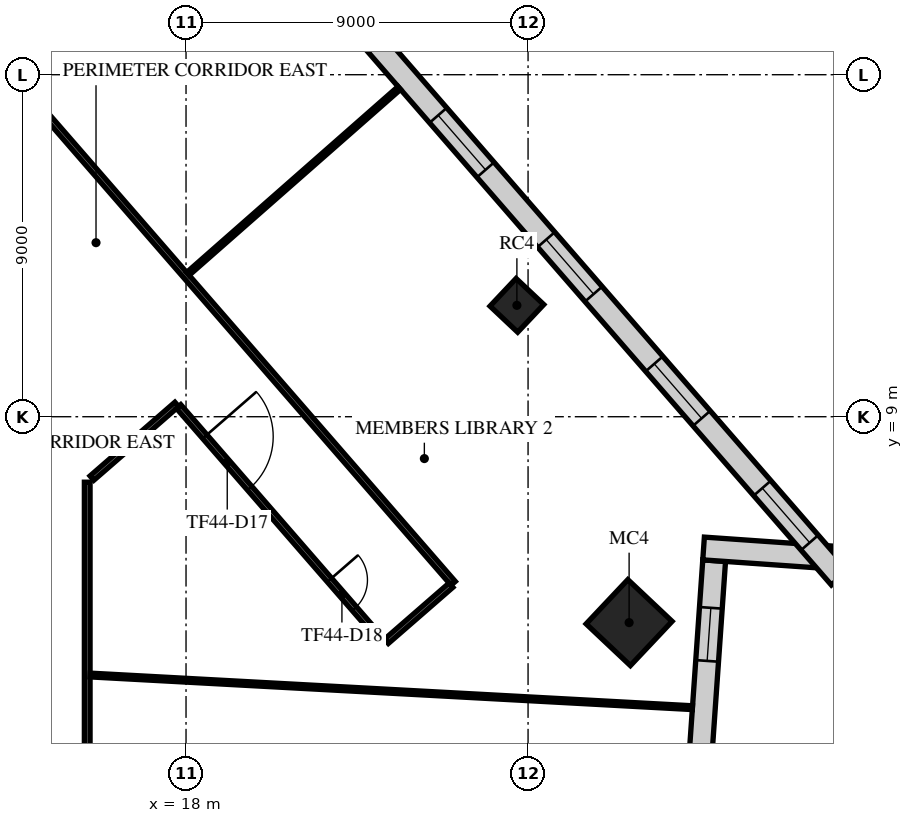
"""IFC4 building model, lengths in metres.
Left out: names, types, materials, properties, quantities, classifications, styles, units other than length and angle.
Written with IfcOpenShell. Run it as: python <this file> out.ifc"""

import sys

from ifc_helpers import new_model, si_unit, direction, frame, frame_2d, origin, origin_2d, place, context, subcontext, project, spatial, rectangle, extrude, element, fill, save


model = new_model("IFC4")
c1 = context("Model", 3, precision=1e-05, world=origin(), true_north=direction((0.0, 1.0)))
c2 = subcontext(c1, "Body", "Model", "MODEL_VIEW")
j1 = project(units=[si_unit("LENGTHUNIT", "METRE"), si_unit("PLANEANGLEUNIT", "RADIAN")], contexts=[c1])
p1 = place(None, origin())
s1 = spatial("IfcSite", under=j1, at=p1, CompositionType="ELEMENT")
p2 = place(p1, origin())
s2 = spatial("IfcBuilding", under=s1, at=p2, CompositionType="ELEMENT")
p3 = place(p2, frame((0.0, 0.0, 193.3)))
s3 = spatial("IfcBuildingStorey", under=s2, at=p3, CompositionType="ELEMENT", Elevation=193.3)
p4 = place(p3, frame((29.659, 3.582, 0.0), z_axis=(0.0, 0.0, 1.0), x_axis=(0.685916152371, 0.727680583715, 0.0)))
e1 = element("IfcColumn", 1, at=p4, inside=s3, PredefinedType="COLUMN", context=c2, shape_type="SweptSolid", body=[
    extrude(rectangle(XDim=1.6, YDim=1.6, at=origin_2d()), origin(), (0.0, 0.0, 1.0), 4.0),
])
p5 = place(p3, frame((26.706, 11.931, 0.0), z_axis=(0.0, 0.0, 1.0), x_axis=(0.685916152371, 0.727680583715, 0.0)))
e2 = element("IfcColumn", 2, at=p5, inside=s3, PredefinedType="COLUMN", context=c2, shape_type="SweptSolid", body=[
    extrude(rectangle(XDim=1.0, YDim=1.0, at=origin_2d()), origin(), (0.0, 0.0, 1.0), 4.0),
])
p6 = place(p3, frame((31.354, -2.547, 0.0), z_axis=(0.0, 0.0, 1.0), x_axis=(0.069743544409, 0.997564954283, 0.0)))
e3 = element("IfcWall", 3, at=p6, inside=s3, PredefinedType="STANDARD", context=c2, shape_type="SweptSolid", body=[
    extrude(rectangle(XDim=7.778, YDim=0.6, at=frame_2d((3.889, 0.0))), origin(), (0.0, 0.0, 1.0), 3.62),
])
p7 = place(p6, frame((1.244, 0.0, 0.9)))
e4 = element("IfcOpeningElement", 4, at=p7, cuts=e3, PredefinedType="OPENING", context=c2, shape_type="SweptSolid", body=[
    extrude(rectangle(XDim=1.4, YDim=2.1, at=frame_2d((0.7, 1.05))), frame((0.0, 0.31, 0.0), z_axis=(0.0, -1.0, 0.0), x_axis=(1.0, 0.0, 0.0)), (0.0, 0.0, 1.0), 0.62),
])
p8 = place(p6, frame((5.134, 0.0, 0.9)))
e5 = element("IfcOpeningElement", 5, at=p8, cuts=e3, PredefinedType="OPENING", context=c2, shape_type="SweptSolid", body=[
    extrude(rectangle(XDim=1.4, YDim=2.1, at=frame_2d((0.7, 1.05))), frame((0.0, 0.31, 0.0), z_axis=(0.0, -1.0, 0.0), x_axis=(1.0, 0.0, 0.0)), (0.0, 0.0, 1.0), 0.62),
])
p9 = place(p3, frame((31.618, 5.532, 0.0), z_axis=(0.0, 0.0, 1.0), x_axis=(0.997563916762, -0.069758382828, 0.0)))
e6 = element("IfcWall", 6, at=p9, inside=s3, PredefinedType="STANDARD", context=c2, shape_type="SweptSolid", body=[
    extrude(rectangle(XDim=3.846, YDim=0.6, at=frame_2d((1.923, 0.0))), origin(), (0.0, 0.0, 1.0), 3.62),
])
p10 = place(p3, frame((35.208, 4.768, 0.0), z_axis=(0.0, 0.0, 1.0), x_axis=(-0.656058749455, 0.754709823219, 0.0)))
e7 = element("IfcWall", 7, at=p10, inside=s3, PredefinedType="STANDARD", context=c2, shape_type="SweptSolid", body=[
    extrude(rectangle(XDim=39.0, YDim=0.6, at=frame_2d((19.5, 0.0))), origin(), (0.0, 0.0, 1.0), 3.62),
])
p11 = place(p10, frame((1.217, 0.0, 0.9)))
e8 = element("IfcOpeningElement", 8, at=p11, cuts=e7, PredefinedType="OPENING", context=c2, shape_type="SweptSolid", body=[
    extrude(rectangle(XDim=1.9, YDim=2.1, at=frame_2d((0.95, 1.05))), frame((0.0, 0.31, 0.0), z_axis=(0.0, -1.0, 0.0), x_axis=(1.0, 0.0, 0.0)), (0.0, 0.0, 1.0), 0.62),
])
p12 = place(p10, frame((5.55, 0.0, 0.9)))
e9 = element("IfcOpeningElement", 9, at=p12, cuts=e7, PredefinedType="OPENING", context=c2, shape_type="SweptSolid", body=[
    extrude(rectangle(XDim=1.9, YDim=2.1, at=frame_2d((0.95, 1.05))), frame((0.0, 0.31, 0.0), z_axis=(0.0, -1.0, 0.0), x_axis=(1.0, 0.0, 0.0)), (0.0, 0.0, 1.0), 0.62),
])
p13 = place(p10, frame((9.883, 0.0, 0.9)))
e10 = element("IfcOpeningElement", 10, at=p13, cuts=e7, PredefinedType="OPENING", context=c2, shape_type="SweptSolid", body=[
    extrude(rectangle(XDim=1.9, YDim=2.1, at=frame_2d((0.95, 1.05))), frame((0.0, 0.31, 0.0), z_axis=(0.0, -1.0, 0.0), x_axis=(1.0, 0.0, 0.0)), (0.0, 0.0, 1.0), 0.62),
])
p14 = place(p10, frame((14.217, 0.0, 0.9)))
e11 = element("IfcOpeningElement", 11, at=p14, cuts=e7, PredefinedType="OPENING", context=c2, shape_type="SweptSolid", body=[
    extrude(rectangle(XDim=1.9, YDim=2.1, at=frame_2d((0.95, 1.05))), frame((0.0, 0.31, 0.0), z_axis=(0.0, -1.0, 0.0), x_axis=(1.0, 0.0, 0.0)), (0.0, 0.0, 1.0), 0.62),
])
p15 = place(p10, frame((18.55, 0.0, 0.9)))
e12 = element("IfcOpeningElement", 12, at=p15, cuts=e7, PredefinedType="OPENING", context=c2, shape_type="SweptSolid", body=[
    extrude(rectangle(XDim=1.9, YDim=2.1, at=frame_2d((0.95, 1.05))), frame((0.0, 0.31, 0.0), z_axis=(0.0, -1.0, 0.0), x_axis=(1.0, 0.0, 0.0)), (0.0, 0.0, 1.0), 0.62),
])
p16 = place(p10, frame((22.883, 0.0, 0.9)))
e13 = element("IfcOpeningElement", 13, at=p16, cuts=e7, PredefinedType="OPENING", context=c2, shape_type="SweptSolid", body=[
    extrude(rectangle(XDim=1.9, YDim=2.1, at=frame_2d((0.95, 1.05))), frame((0.0, 0.31, 0.0), z_axis=(0.0, -1.0, 0.0), x_axis=(1.0, 0.0, 0.0)), (0.0, 0.0, 1.0), 0.62),
])
p17 = place(p10, frame((27.217, 0.0, 0.9)))
e14 = element("IfcOpeningElement", 14, at=p17, cuts=e7, PredefinedType="OPENING", context=c2, shape_type="SweptSolid", body=[
    extrude(rectangle(XDim=1.9, YDim=2.1, at=frame_2d((0.95, 1.05))), frame((0.0, 0.31, 0.0), z_axis=(0.0, -1.0, 0.0), x_axis=(1.0, 0.0, 0.0)), (0.0, 0.0, 1.0), 0.62),
])
p18 = place(p10, frame((31.55, 0.0, 0.9)))
e15 = element("IfcOpeningElement", 15, at=p18, cuts=e7, PredefinedType="OPENING", context=c2, shape_type="SweptSolid", body=[
    extrude(rectangle(XDim=1.9, YDim=2.1, at=frame_2d((0.95, 1.05))), frame((0.0, 0.31, 0.0), z_axis=(0.0, -1.0, 0.0), x_axis=(1.0, 0.0, 0.0)), (0.0, 0.0, 1.0), 0.62),
])
p19 = place(p10, frame((35.883, 0.0, 0.9)))
e16 = element("IfcOpeningElement", 16, at=p19, cuts=e7, PredefinedType="OPENING", context=c2, shape_type="SweptSolid", body=[
    extrude(rectangle(XDim=1.9, YDim=2.1, at=frame_2d((0.95, 1.05))), frame((0.0, 0.31, 0.0), z_axis=(0.0, -1.0, 0.0), x_axis=(1.0, 0.0, 0.0)), (0.0, 0.0, 1.0), 0.62),
])
p20 = place(p3, frame((8.103, 24.087, 0.0), z_axis=(0.0, 0.0, 1.0), x_axis=(0.656048444225, -0.754718781289, 0.0)))
e17 = element("IfcWall", 17, at=p20, inside=s3, PredefinedType="PARTITIONING", context=c2, shape_type="SweptSolid", body=[
    extrude(rectangle(XDim=25.8, YDim=0.15, at=frame_2d((12.9, 0.0))), origin(), (0.0, 0.0, 1.0), 3.17),
])
p21 = place(p3, frame((15.4, -8.667, 0.0), z_axis=(0.0, 0.0, 1.0), x_axis=(0.0, 1.0, 0.0)))
e18 = element("IfcWall", 18, at=p21, inside=s3, PredefinedType="PARTITIONING", context=c2, shape_type="SweptSolid", body=[
    extrude(rectangle(XDim=15.944, YDim=0.15, at=frame_2d((7.972, 0.0))), origin(), (0.0, 0.0, 1.0), 3.17),
])
p22 = place(p3, frame((15.524, 7.385, 0.0), z_axis=(0.0, 0.0, 1.0), x_axis=(0.754751247574, 0.656011093111, 0.0)))
e19 = element("IfcWall", 19, at=p22, inside=s3, PredefinedType="PARTITIONING", context=c2, shape_type="SweptSolid", body=[
    extrude(rectangle(XDim=2.957, YDim=0.15, at=frame_2d((1.479, 0.0))), origin(), (0.0, 0.0, 1.0), 3.17),
])
p23 = place(p3, frame((17.805, 9.268, 0.0), z_axis=(0.0, 0.0, 1.0), x_axis=(0.656027059873, -0.754737369364, 0.0)))
e20 = element("IfcWall", 20, at=p23, inside=s3, PredefinedType="PARTITIONING", context=c2, shape_type="SweptSolid", body=[
    extrude(rectangle(XDim=8.251, YDim=0.15, at=frame_2d((4.125, 0.0))), origin(), (0.0, 0.0, 1.0), 3.17),
])
p24 = place(p23, frame((1.05, 0.0, 0.0)))
e21 = element("IfcOpeningElement", 21, at=p24, cuts=e20, PredefinedType="OPENING", context=c2, shape_type="SweptSolid", body=[
    extrude(rectangle(XDim=1.8, YDim=2.1, at=frame_2d((0.9, 1.05))), frame((0.0, 0.085, 0.0), z_axis=(0.0, -1.0, 0.0), x_axis=(1.0, 0.0, 0.0)), (0.0, 0.0, 1.0), 0.17),
])
p25 = place(p23, frame((6.05, 0.0, 0.0)))
e22 = element("IfcOpeningElement", 22, at=p25, cuts=e20, PredefinedType="OPENING", context=c2, shape_type="SweptSolid", body=[
    extrude(rectangle(XDim=1.0, YDim=2.1, at=frame_2d((0.5, 1.05))), frame((0.0, 0.085, 0.0), z_axis=(0.0, -1.0, 0.0), x_axis=(1.0, 0.0, 0.0)), (0.0, 0.0, 1.0), 0.17),
])
p26 = place(p3, frame((23.275, 3.09, 0.0), z_axis=(0.0, 0.0, 1.0), x_axis=(0.754495728819, 0.656304955942, 0.0)))
e23 = element("IfcWall", 23, at=p26, inside=s3, PredefinedType="PARTITIONING", context=c2, shape_type="SweptSolid", body=[
    extrude(rectangle(XDim=2.25, YDim=0.15, at=frame_2d((1.125, 0.0))), origin(), (0.0, 0.0, 1.0), 3.17),
])
p27 = place(p3, frame((15.478, 2.203, 0.0), z_axis=(0.0, 0.0, 1.0), x_axis=(0.998532575908, -0.054154361321, 0.0)))
e24 = element("IfcWall", 24, at=p27, inside=s3, PredefinedType="PARTITIONING", context=c2, shape_type="SweptSolid", body=[
    extrude(rectangle(XDim=15.869, YDim=0.1, at=frame_2d((7.935, 0.0))), origin(), (0.0, 0.0, 1.0), 3.62),
])
p28 = place(p3, frame((18.05, 12.76, 0.0), z_axis=(0.0, 0.0, 1.0), x_axis=(0.751001885152, 0.660300059441, 0.0)))
e25 = element("IfcWall", 25, at=p28, inside=s3, PredefinedType="PARTITIONING", context=c2, shape_type="SweptSolid", body=[
    extrude(rectangle(XDim=7.405, YDim=0.1, at=frame_2d((3.702, 0.0))), origin(), (0.0, 0.0, 1.0), 3.17),
])
p29 = place(p8, origin())
e26 = element("IfcWindow", 26, at=p29, inside=s3, PartitioningType="SINGLE_PANEL", PredefinedType="WINDOW", context=c2, shape_type="SweptSolid", body=[
    extrude(rectangle(XDim=1.4, YDim=2.1, at=frame_2d((0.7, 1.05))), frame((0.0, 0.03, 0.0), z_axis=(0.0, -1.0, 0.0), x_axis=(1.0, 0.0, 0.0)), (0.0, 0.0, 1.0), 0.06),
])
fill(e5, e26)
p30 = place(p11, origin())
e27 = element("IfcWindow", 27, at=p30, inside=s3, PartitioningType="SINGLE_PANEL", PredefinedType="WINDOW", context=c2, shape_type="SweptSolid", body=[
    extrude(rectangle(XDim=1.9, YDim=2.1, at=frame_2d((0.95, 1.05))), frame((0.0, 0.03, 0.0), z_axis=(0.0, -1.0, 0.0), x_axis=(1.0, 0.0, 0.0)), (0.0, 0.0, 1.0), 0.06),
])
fill(e8, e27)
p31 = place(p12, origin())
e28 = element("IfcWindow", 28, at=p31, inside=s3, PartitioningType="SINGLE_PANEL", PredefinedType="WINDOW", context=c2, shape_type="SweptSolid", body=[
    extrude(rectangle(XDim=1.9, YDim=2.1, at=frame_2d((0.95, 1.05))), frame((0.0, 0.03, 0.0), z_axis=(0.0, -1.0, 0.0), x_axis=(1.0, 0.0, 0.0)), (0.0, 0.0, 1.0), 0.06),
])
fill(e9, e28)
p32 = place(p13, origin())
e29 = element("IfcWindow", 29, at=p32, inside=s3, PartitioningType="SINGLE_PANEL", PredefinedType="WINDOW", context=c2, shape_type="SweptSolid", body=[
    extrude(rectangle(XDim=1.9, YDim=2.1, at=frame_2d((0.95, 1.05))), frame((0.0, 0.03, 0.0), z_axis=(0.0, -1.0, 0.0), x_axis=(1.0, 0.0, 0.0)), (0.0, 0.0, 1.0), 0.06),
])
fill(e10, e29)
p33 = place(p14, origin())
e30 = element("IfcWindow", 30, at=p33, inside=s3, PartitioningType="SINGLE_PANEL", PredefinedType="WINDOW", context=c2, shape_type="SweptSolid", body=[
    extrude(rectangle(XDim=1.9, YDim=2.1, at=frame_2d((0.95, 1.05))), frame((0.0, 0.03, 0.0), z_axis=(0.0, -1.0, 0.0), x_axis=(1.0, 0.0, 0.0)), (0.0, 0.0, 1.0), 0.06),
])
fill(e11, e30)
p34 = place(p24, frame((1.8, 0.0, 0.0), z_axis=(0.0, 0.0, 1.0), x_axis=(-1.0, 0.0, 0.0)))
e31 = element("IfcDoor", 31, at=p34, inside=s3, OperationType="DOUBLE_DOOR_SINGLE_SWING", PredefinedType="DOOR", context=c2, shape_type="SweptSolid", body=[
    extrude(rectangle(XDim=1.8, YDim=2.1, at=frame_2d((0.9, 1.05))), frame((0.0, 0.025, 0.0), z_axis=(0.0, -1.0, 0.0), x_axis=(1.0, 0.0, 0.0)), (0.0, 0.0, 1.0), 0.05),
])
fill(e21, e31)
p35 = place(p25, frame((1.0, 0.0, 0.0), z_axis=(0.0, 0.0, 1.0), x_axis=(-1.0, 0.0, 0.0)))
e32 = element("IfcDoor", 32, at=p35, inside=s3, OperationType="SINGLE_SWING_RIGHT", PredefinedType="DOOR", context=c2, shape_type="SweptSolid", body=[
    extrude(rectangle(XDim=1.0, YDim=2.1, at=frame_2d((0.5, 1.05))), frame((0.0, 0.025, 0.0), z_axis=(0.0, -1.0, 0.0), x_axis=(1.0, 0.0, 0.0)), (0.0, 0.0, 1.0), 0.05),
])
fill(e22, e32)
save(model, sys.argv[1])
